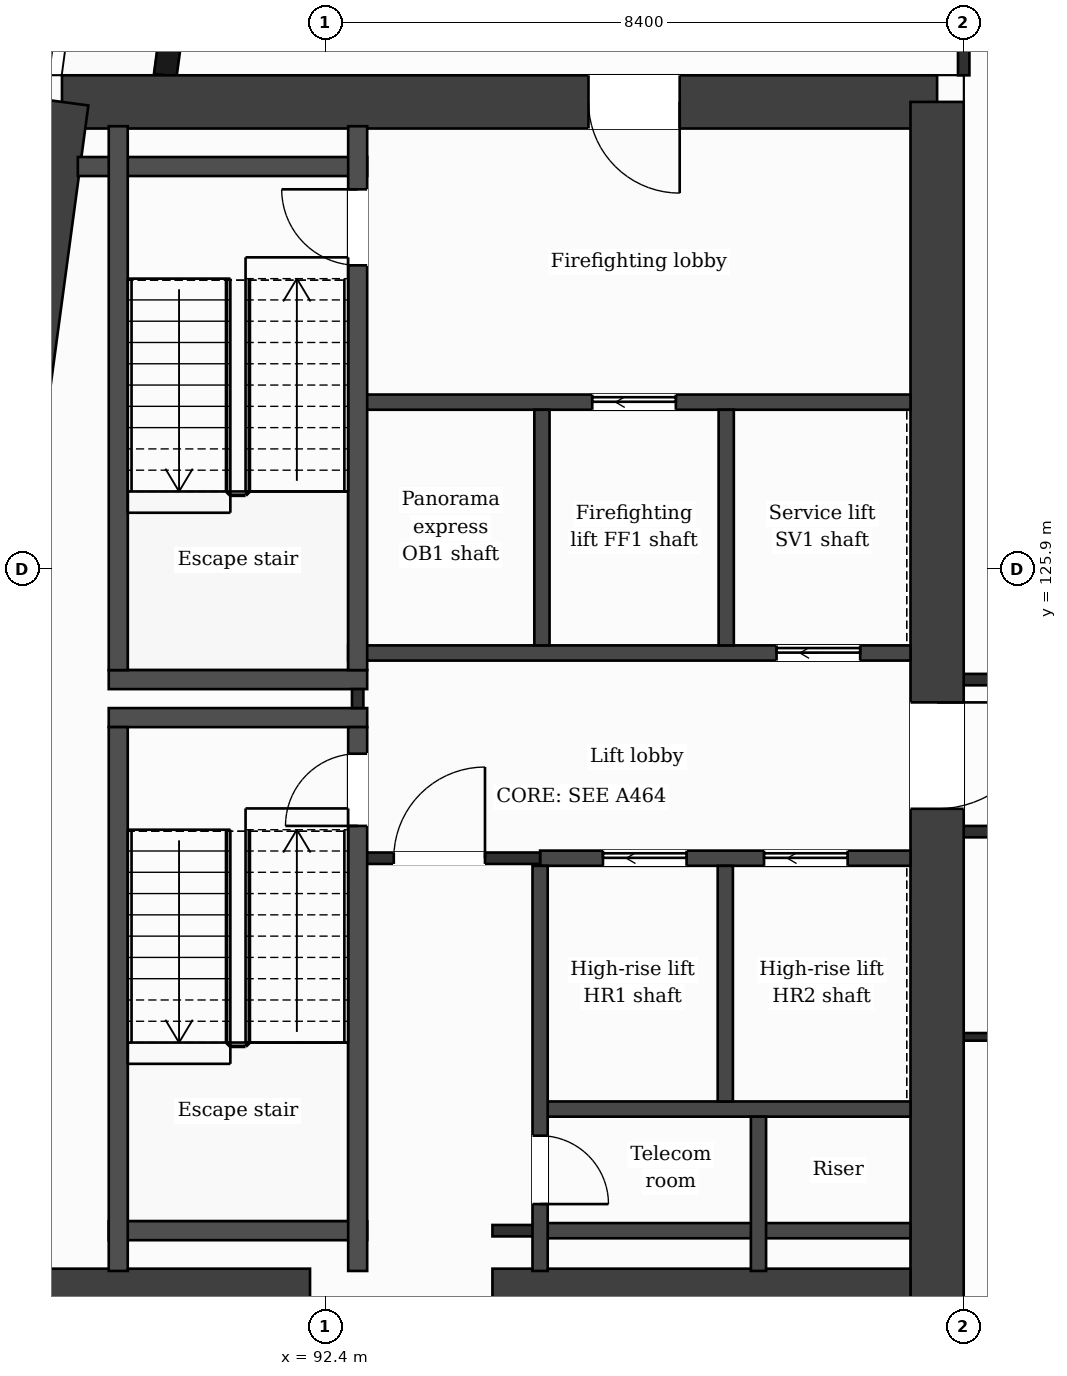
"""IFC4 building model, lengths in metres.
Left out: names, types, materials, properties, quantities, classifications, styles, units other than length and angle.
Written with IfcOpenShell. Run it as: python <this file> out.ifc"""

import sys

from ifc_helpers import new_model, si_unit, direction, frame, frame_2d, origin, place, context, subcontext, project, spatial, rectangle, extrude, element, fill, save


model = new_model("IFC4")
c1 = context("Model", 3, precision=1e-05, world=origin(), true_north=direction((0.0, 1.0)))
c2 = subcontext(c1, "Body", "Model", "MODEL_VIEW")
j1 = project(units=[si_unit("LENGTHUNIT", "METRE"), si_unit("PLANEANGLEUNIT", "RADIAN")], contexts=[c1])
p1 = place(None, origin())
s1 = spatial("IfcSite", under=j1, at=p1, CompositionType="ELEMENT")
p2 = place(p1, origin())
s2 = spatial("IfcBuilding", under=s1, at=p2, CompositionType="ELEMENT")
p3 = place(p2, frame((0.0, 0.0, 262.7)))
s3 = spatial("IfcBuildingStorey", under=s2, at=p3, CompositionType="ELEMENT", Elevation=262.7)
p4 = place(p3, frame((88.937, 132.05, 0.0), z_axis=(0.0, 0.0, 1.0), x_axis=(1.0, 0.0, 0.0)))
e1 = element("IfcWall", 1, at=p4, inside=s3, PredefinedType="SHEAR", context=c2, shape_type="SweptSolid", body=[
    extrude(rectangle(XDim=11.513, YDim=0.7, at=frame_2d((5.757, 0.0))), origin(), (0.0, 0.0, 1.0), 3.7),
])
p5 = place(p4, frame((6.927, 0.0, 0.0)))
e2 = element("IfcOpeningElement", 2, at=p5, cuts=e1, PredefinedType="OPENING", context=c2, shape_type="SweptSolid", body=[
    extrude(rectangle(XDim=1.2, YDim=2.1, at=frame_2d((0.6, 1.05))), frame((0.0, 0.36, 0.0), z_axis=(0.0, -1.0, 0.0), x_axis=(1.0, 0.0, 0.0)), (0.0, 0.0, 1.0), 0.72),
])
p6 = place(p3, frame((100.45, 132.05, 0.0), z_axis=(0.0, 0.0, 1.0), x_axis=(0.0, -1.0, 0.0)))
e3 = element("IfcWall", 3, at=p6, inside=s3, PredefinedType="SHEAR", context=c2, shape_type="SweptSolid", body=[
    extrude(rectangle(XDim=21.3, YDim=0.7, at=frame_2d((10.65, 0.0))), origin(), (0.0, 0.0, 1.0), 3.7),
])
p7 = place(p6, frame((7.9, 0.0, 0.0)))
e4 = element("IfcOpeningElement", 4, at=p7, cuts=e3, PredefinedType="OPENING", context=c2, shape_type="SweptSolid", body=[
    extrude(rectangle(XDim=1.4, YDim=2.1, at=frame_2d((0.7, 1.05))), frame((0.0, 0.36, 0.0), z_axis=(0.0, -1.0, 0.0), x_axis=(1.0, 0.0, 0.0)), (0.0, 0.0, 1.0), 0.72),
])
p8 = place(p3, frame((86.07, 110.75, 0.0), z_axis=(0.0, 0.0, 1.0), x_axis=(0.133406218907, 0.991061441464, 0.0)))
e5 = element("IfcWall", 5, at=p8, inside=s3, PredefinedType="SHEAR", context=c2, shape_type="SweptSolid", body=[
    extrude(rectangle(XDim=21.492, YDim=0.7, at=frame_2d((10.746, 0.0))), origin(), (0.0, 0.0, 1.0), 3.7),
])
p9 = place(p3, frame((87.123, 116.35, 0.0), z_axis=(0.0, 0.0, 1.0), x_axis=(1.0, 0.0, 0.0)))
e6 = element("IfcWall", 6, at=p9, inside=s3, PredefinedType="SHEAR", context=c2, shape_type="SweptSolid", body=[
    extrude(rectangle(XDim=5.077, YDim=0.7, at=frame_2d((2.539, 0.0))), origin(), (0.0, 0.0, 1.0), 3.7),
])
p10 = place(p3, frame((94.6, 116.35, 0.0), z_axis=(0.0, 0.0, 1.0), x_axis=(1.0, 0.0, 0.0)))
e7 = element("IfcWall", 7, at=p10, inside=s3, PredefinedType="SHEAR", context=c2, shape_type="SweptSolid", body=[
    extrude(rectangle(XDim=5.5, YDim=0.7, at=frame_2d((2.75, 0.0))), origin(), (0.0, 0.0, 1.0), 3.7),
])
p11 = place(p3, frame((91.177, 138.95, 0.0), z_axis=(0.0, 0.0, 1.0), x_axis=(-0.133426664613, -0.991058689065, 0.0)))
e8 = element("IfcWall", 8, at=p11, inside=s3, PredefinedType="SOLIDWALL", context=c2, shape_type="SweptSolid", body=[
    extrude(rectangle(XDim=6.609, YDim=0.3, at=frame_2d((3.305, 0.0))), origin(), (0.0, 0.0, 1.0), 3.38),
])
p12 = place(p11, frame((1.039, 0.0, 0.9)))
e9 = element("IfcOpeningElement", 9, at=p12, cuts=e8, PredefinedType="OPENING", context=c2, shape_type="SweptSolid", body=[
    extrude(rectangle(XDim=1.2, YDim=2.1, at=frame_2d((0.6, 1.05))), frame((0.0, 0.16, 0.0), z_axis=(0.0, -1.0, 0.0), x_axis=(1.0, 0.0, 0.0)), (0.0, 0.0, 1.0), 0.32),
])
p13 = place(p11, frame((4.294, 0.0, 0.0)))
e10 = element("IfcOpeningElement", 10, at=p13, cuts=e8, PredefinedType="OPENING", context=c2, shape_type="SweptSolid", body=[
    extrude(rectangle(XDim=1.2, YDim=2.4, at=frame_2d((0.6, 1.2))), frame((0.0, 0.16, 0.0), z_axis=(0.0, -1.0, 0.0), x_axis=(1.0, 0.0, 0.0)), (0.0, 0.0, 1.0), 0.32),
])
p14 = place(p3, frame((95.227, 117.2, 0.0), z_axis=(0.0, 0.0, 1.0), x_axis=(1.0, 0.0, 0.0)))
e11 = element("IfcWall", 11, at=p14, inside=s3, PredefinedType="PARTITIONING", context=c2, shape_type="SweptSolid", body=[
    extrude(rectangle(XDim=4.873, YDim=0.2, at=frame_2d((2.437, 0.0))), origin(), (0.0, 0.0, 1.0), 3.38),
])
p15 = place(p3, frame((94.6, 117.2, 0.0), z_axis=(0.0, 0.0, 1.0), x_axis=(1.0, 0.0, 0.0)))
e12 = element("IfcWall", 12, at=p15, inside=s3, PredefinedType="PARTITIONING", context=c2, shape_type="SweptSolid", body=[
    extrude(rectangle(XDim=0.627, YDim=0.15, at=frame_2d((0.313, 0.0))), origin(), (0.0, 0.0, 1.0), 3.38),
])
p16 = place(p3, frame((89.552, 117.2, 0.0), z_axis=(0.0, 0.0, 1.0), x_axis=(1.0, 0.0, 0.0)))
e13 = element("IfcWall", 13, at=p16, inside=s3, PredefinedType="PARTITIONING", context=c2, shape_type="SweptSolid", body=[
    extrude(rectangle(XDim=3.4, YDim=0.25, at=frame_2d((1.7, 0.0))), origin(), (0.0, 0.0, 1.0), 3.38),
])
p17 = place(p3, frame((95.227, 118.8, 0.0), z_axis=(0.0, 0.0, 1.0), x_axis=(1.0, 0.0, 0.0)))
e14 = element("IfcWall", 14, at=p17, inside=s3, PredefinedType="PARTITIONING", context=c2, shape_type="SweptSolid", body=[
    extrude(rectangle(XDim=4.873, YDim=0.2, at=frame_2d((2.437, 0.0))), origin(), (0.0, 0.0, 1.0), 3.38),
])
p18 = place(p3, frame((100.8, 119.75, 0.0), z_axis=(0.0, 0.0, 1.0), x_axis=(1.0, 0.0, 0.0)))
e15 = element("IfcWall", 15, at=p18, inside=s3, PredefinedType="PARTITIONING", context=c2, shape_type="SweptSolid", body=[
    extrude(rectangle(XDim=1.85, YDim=0.1, at=frame_2d((0.925, 0.0))), origin(), (0.0, 0.0, 1.0), 3.38),
])
p19 = place(p3, frame((95.227, 122.1, 0.0), z_axis=(0.0, 0.0, 1.0), x_axis=(1.0, 0.0, 0.0)))
e16 = element("IfcWall", 16, at=p19, inside=s3, PredefinedType="PARTITIONING", context=c2, shape_type="SweptSolid", body=[
    extrude(rectangle(XDim=4.873, YDim=0.2, at=frame_2d((2.437, 0.0))), origin(), (0.0, 0.0, 1.0), 3.38),
])
p20 = place(p19, frame((0.827, 0.0, 0.0)))
e17 = element("IfcOpeningElement", 17, at=p20, cuts=e16, PredefinedType="OPENING", context=c2, shape_type="SweptSolid", body=[
    extrude(rectangle(XDim=1.1, YDim=2.1, at=frame_2d((0.55, 1.05))), frame((0.0, 0.11, 0.0), z_axis=(0.0, -1.0, 0.0), x_axis=(1.0, 0.0, 0.0)), (0.0, 0.0, 1.0), 0.22),
])
p21 = place(p19, frame((2.946, 0.0, 0.0)))
e18 = element("IfcOpeningElement", 18, at=p21, cuts=e16, PredefinedType="OPENING", context=c2, shape_type="SweptSolid", body=[
    extrude(rectangle(XDim=1.1, YDim=2.1, at=frame_2d((0.55, 1.05))), frame((0.0, 0.11, 0.0), z_axis=(0.0, -1.0, 0.0), x_axis=(1.0, 0.0, 0.0)), (0.0, 0.0, 1.0), 0.22),
])
p22 = place(p3, frame((92.827, 122.1, 0.0), z_axis=(0.0, 0.0, 1.0), x_axis=(1.0, 0.0, 0.0)))
e19 = element("IfcWall", 19, at=p22, inside=s3, PredefinedType="PARTITIONING", context=c2, shape_type="SweptSolid", body=[
    extrude(rectangle(XDim=2.4, YDim=0.15, at=frame_2d((1.2, 0.0))), origin(), (0.0, 0.0, 1.0), 3.38),
])
p23 = place(p22, frame((0.475, 0.0, 0.0)))
e20 = element("IfcOpeningElement", 20, at=p23, cuts=e19, PredefinedType="OPENING", context=c2, shape_type="SweptSolid", body=[
    extrude(rectangle(XDim=1.2, YDim=2.1, at=frame_2d((0.6, 1.05))), frame((0.0, 0.085, 0.0), z_axis=(0.0, -1.0, 0.0), x_axis=(1.0, 0.0, 0.0)), (0.0, 0.0, 1.0), 0.17),
])
p24 = place(p3, frame((100.8, 122.45, 0.0), z_axis=(0.0, 0.0, 1.0), x_axis=(1.0, 0.0, 0.0)))
e21 = element("IfcWall", 21, at=p24, inside=s3, PredefinedType="PARTITIONING", context=c2, shape_type="SweptSolid", body=[
    extrude(rectangle(XDim=25.2, YDim=0.15, at=frame_2d((12.6, 0.0))), origin(), (0.0, 0.0, 1.0), 3.38),
])
p25 = place(p24, frame((5.55, 0.0, 0.0)))
e22 = element("IfcOpeningElement", 22, at=p25, cuts=e21, PredefinedType="OPENING", context=c2, shape_type="SweptSolid", body=[
    extrude(rectangle(XDim=1.0, YDim=2.1, at=frame_2d((0.5, 1.05))), frame((0.0, 0.085, 0.0), z_axis=(0.0, -1.0, 0.0), x_axis=(1.0, 0.0, 0.0)), (0.0, 0.0, 1.0), 0.17),
])
p26 = place(p24, frame((8.65, 0.0, 0.0)))
e23 = element("IfcOpeningElement", 23, at=p26, cuts=e21, PredefinedType="OPENING", context=c2, shape_type="SweptSolid", body=[
    extrude(rectangle(XDim=1.0, YDim=2.1, at=frame_2d((0.5, 1.05))), frame((0.0, 0.085, 0.0), z_axis=(0.0, -1.0, 0.0), x_axis=(1.0, 0.0, 0.0)), (0.0, 0.0, 1.0), 0.17),
])
p27 = place(p24, frame((19.83, 0.0, 0.0)))
e24 = element("IfcOpeningElement", 24, at=p27, cuts=e21, PredefinedType="OPENING", context=c2, shape_type="SweptSolid", body=[
    extrude(rectangle(XDim=1.0, YDim=2.1, at=frame_2d((0.5, 1.05))), frame((0.0, 0.085, 0.0), z_axis=(0.0, -1.0, 0.0), x_axis=(1.0, 0.0, 0.0)), (0.0, 0.0, 1.0), 0.17),
])
for number, where, z_axis, x_axis in (
    (25, (89.552, 123.95, 0.0), (0.0, 0.0, 1.0), (1.0, 0.0, 0.0)),
    (26, (89.552, 124.45, 0.0), (0.0, 0.0, 1.0), (1.0, 0.0, 0.0)),
):
    element("IfcWall", number, at=place(p3, frame(where, z_axis=z_axis, x_axis=x_axis)), inside=s3, PredefinedType="PARTITIONING", context=c2, shape_type="SweptSolid", body=[
        extrude(rectangle(XDim=3.4, YDim=0.25, at=frame_2d((1.7, 0.0))), origin(), (0.0, 0.0, 1.0), 3.38),
    ])
p28 = place(p3, frame((100.8, 124.45, 0.0), z_axis=(0.0, 0.0, 1.0), x_axis=(1.0, 0.0, 0.0)))
e27 = element("IfcWall", 27, at=p28, inside=s3, PredefinedType="PARTITIONING", context=c2, shape_type="SweptSolid", body=[
    extrude(rectangle(XDim=25.2, YDim=0.15, at=frame_2d((12.6, 0.0))), origin(), (0.0, 0.0, 1.0), 3.38),
])
p29 = place(p28, frame((0.975, 0.0, 0.0)))
e28 = element("IfcOpeningElement", 28, at=p29, cuts=e27, PredefinedType="OPENING", context=c2, shape_type="SweptSolid", body=[
    extrude(rectangle(XDim=1.0, YDim=2.1, at=frame_2d((0.5, 1.05))), frame((0.0, 0.085, 0.0), z_axis=(0.0, -1.0, 0.0), x_axis=(1.0, 0.0, 0.0)), (0.0, 0.0, 1.0), 0.17),
])
p30 = place(p28, frame((5.175, 0.0, 0.0)))
e29 = element("IfcOpeningElement", 29, at=p30, cuts=e27, PredefinedType="OPENING", context=c2, shape_type="SweptSolid", body=[
    extrude(rectangle(XDim=1.0, YDim=2.1, at=frame_2d((0.5, 1.05))), frame((0.0, 0.085, 0.0), z_axis=(0.0, -1.0, 0.0), x_axis=(1.0, 0.0, 0.0)), (0.0, 0.0, 1.0), 0.17),
])
p31 = place(p28, frame((13.775, 0.0, 0.0)))
e30 = element("IfcOpeningElement", 30, at=p31, cuts=e27, PredefinedType="OPENING", context=c2, shape_type="SweptSolid", body=[
    extrude(rectangle(XDim=1.0, YDim=2.1, at=frame_2d((0.5, 1.05))), frame((0.0, 0.085, 0.0), z_axis=(0.0, -1.0, 0.0), x_axis=(1.0, 0.0, 0.0)), (0.0, 0.0, 1.0), 0.17),
])
p32 = place(p28, frame((17.67, 0.0, 0.0)))
e31 = element("IfcOpeningElement", 31, at=p32, cuts=e27, PredefinedType="OPENING", context=c2, shape_type="SweptSolid", body=[
    extrude(rectangle(XDim=1.0, YDim=2.1, at=frame_2d((0.5, 1.05))), frame((0.0, 0.085, 0.0), z_axis=(0.0, -1.0, 0.0), x_axis=(1.0, 0.0, 0.0)), (0.0, 0.0, 1.0), 0.17),
])
p33 = place(p28, frame((23.225, 0.0, 0.0)))
e32 = element("IfcOpeningElement", 32, at=p33, cuts=e27, PredefinedType="OPENING", context=c2, shape_type="SweptSolid", body=[
    extrude(rectangle(XDim=1.0, YDim=2.1, at=frame_2d((0.5, 1.05))), frame((0.0, 0.085, 0.0), z_axis=(0.0, -1.0, 0.0), x_axis=(1.0, 0.0, 0.0)), (0.0, 0.0, 1.0), 0.17),
])
p34 = place(p3, frame((92.702, 124.8, 0.0), z_axis=(0.0, 0.0, 1.0), x_axis=(1.0, 0.0, 0.0)))
e33 = element("IfcWall", 33, at=p34, inside=s3, PredefinedType="PARTITIONING", context=c2, shape_type="SweptSolid", body=[
    extrude(rectangle(XDim=7.398, YDim=0.2, at=frame_2d((3.699, 0.0))), origin(), (0.0, 0.0, 1.0), 3.38),
])
p35 = place(p34, frame((5.636, 0.0, 0.0)))
e34 = element("IfcOpeningElement", 34, at=p35, cuts=e33, PredefinedType="OPENING", context=c2, shape_type="SweptSolid", body=[
    extrude(rectangle(XDim=1.1, YDim=2.1, at=frame_2d((0.55, 1.05))), frame((0.0, 0.11, 0.0), z_axis=(0.0, -1.0, 0.0), x_axis=(1.0, 0.0, 0.0)), (0.0, 0.0, 1.0), 0.22),
])
p36 = place(p3, frame((92.827, 128.1, 0.0), z_axis=(0.0, 0.0, 1.0), x_axis=(1.0, 0.0, 0.0)))
e35 = element("IfcWall", 35, at=p36, inside=s3, PredefinedType="PARTITIONING", context=c2, shape_type="SweptSolid", body=[
    extrude(rectangle(XDim=7.273, YDim=0.2, at=frame_2d((3.637, 0.0))), origin(), (0.0, 0.0, 1.0), 3.38),
])
p37 = place(p36, frame((3.086, 0.0, 0.0)))
e36 = element("IfcOpeningElement", 36, at=p37, cuts=e35, PredefinedType="OPENING", context=c2, shape_type="SweptSolid", body=[
    extrude(rectangle(XDim=1.1, YDim=2.1, at=frame_2d((0.55, 1.05))), frame((0.0, 0.11, 0.0), z_axis=(0.0, -1.0, 0.0), x_axis=(1.0, 0.0, 0.0)), (0.0, 0.0, 1.0), 0.22),
])
p38 = place(p3, frame((89.146, 131.2, 0.0), z_axis=(0.0, 0.0, 1.0), x_axis=(1.0, 0.0, 0.0)))
e37 = element("IfcWall", 37, at=p38, inside=s3, PredefinedType="PARTITIONING", context=c2, shape_type="SweptSolid", body=[
    extrude(rectangle(XDim=3.806, YDim=0.25, at=frame_2d((1.903, 0.0))), origin(), (0.0, 0.0, 1.0), 3.38),
])
for number, where, z_axis, x_axis in (
    (38, (89.677, 116.67, 0.0), (0.0, 0.0, 1.0), (0.0, 1.0, 0.0)),
    (39, (89.677, 124.575, 0.0), (0.0, 0.0, 1.0), (0.0, 1.0, 0.0)),
):
    element("IfcWall", number, at=place(p3, frame(where, z_axis=z_axis, x_axis=x_axis)), inside=s3, PredefinedType="PARTITIONING", context=c2, shape_type="SweptSolid", body=[
        extrude(rectangle(XDim=7.155, YDim=0.25, at=frame_2d((3.578, 0.0))), origin(), (0.0, 0.0, 1.0), 3.38),
    ])
p39 = place(p3, frame((92.827, 124.075, 0.0), z_axis=(0.0, 0.0, 1.0), x_axis=(0.0, 1.0, 0.0)))
e40 = element("IfcWall", 40, at=p39, inside=s3, PredefinedType="PARTITIONING", context=c2, shape_type="SweptSolid", body=[
    extrude(rectangle(XDim=0.25, YDim=0.15, at=frame_2d((0.125, 0.0))), origin(), (0.0, 0.0, 1.0), 3.38),
])
p40 = place(p3, frame((92.827, 116.67, 0.0), z_axis=(0.0, 0.0, 1.0), x_axis=(0.0, 1.0, 0.0)))
e41 = element("IfcWall", 41, at=p40, inside=s3, PredefinedType="PARTITIONING", context=c2, shape_type="SweptSolid", body=[
    extrude(rectangle(XDim=7.155, YDim=0.25, at=frame_2d((3.578, 0.0))), origin(), (0.0, 0.0, 1.0), 3.38),
])
p41 = place(p40, frame((5.855, 0.0, 0.0)))
e42 = element("IfcOpeningElement", 42, at=p41, cuts=e41, PredefinedType="OPENING", context=c2, shape_type="SweptSolid", body=[
    extrude(rectangle(XDim=0.95, YDim=2.1, at=frame_2d((0.475, 1.05))), frame((0.0, 0.135, 0.0), z_axis=(0.0, -1.0, 0.0), x_axis=(1.0, 0.0, 0.0)), (0.0, 0.0, 1.0), 0.27),
])
p42 = place(p3, frame((92.827, 124.575, 0.0), z_axis=(0.0, 0.0, 1.0), x_axis=(0.0, 1.0, 0.0)))
e43 = element("IfcWall", 43, at=p42, inside=s3, PredefinedType="PARTITIONING", context=c2, shape_type="SweptSolid", body=[
    extrude(rectangle(XDim=7.155, YDim=0.25, at=frame_2d((3.578, 0.0))), origin(), (0.0, 0.0, 1.0), 3.38),
])
p43 = place(p42, frame((5.325, 0.0, 0.0)))
e44 = element("IfcOpeningElement", 44, at=p43, cuts=e43, PredefinedType="OPENING", context=c2, shape_type="SweptSolid", body=[
    extrude(rectangle(XDim=1.0, YDim=2.1, at=frame_2d((0.5, 1.05))), frame((0.0, 0.135, 0.0), z_axis=(0.0, -1.0, 0.0), x_axis=(1.0, 0.0, 0.0)), (0.0, 0.0, 1.0), 0.27),
])
p44 = place(p3, frame((95.227, 116.67, 0.0), z_axis=(0.0, 0.0, 1.0), x_axis=(0.0, 1.0, 0.0)))
e45 = element("IfcWall", 45, at=p44, inside=s3, PredefinedType="PARTITIONING", context=c2, shape_type="SweptSolid", body=[
    extrude(rectangle(XDim=5.33, YDim=0.2, at=frame_2d((2.665, 0.0))), origin(), (0.0, 0.0, 1.0), 3.38),
])
p45 = place(p44, frame((0.88, 0.0, 0.0)))
e46 = element("IfcOpeningElement", 46, at=p45, cuts=e45, PredefinedType="OPENING", context=c2, shape_type="SweptSolid", body=[
    extrude(rectangle(XDim=0.9, YDim=2.1, at=frame_2d((0.45, 1.05))), frame((0.0, 0.11, 0.0), z_axis=(0.0, -1.0, 0.0), x_axis=(1.0, 0.0, 0.0)), (0.0, 0.0, 1.0), 0.22),
])
for number, where, z_axis, x_axis in (
    (47, (95.251, 124.9, 0.0), (0.0, 0.0, 1.0), (0.0, 1.0, 0.0)),
    (48, (97.664, 118.9, 0.0), (0.0, 0.0, 1.0), (0.0, 1.0, 0.0)),
    (49, (97.676, 124.9, 0.0), (0.0, 0.0, 1.0), (0.0, 1.0, 0.0)),
):
    element("IfcWall", number, at=place(p3, frame(where, z_axis=z_axis, x_axis=x_axis)), inside=s3, PredefinedType="PARTITIONING", context=c2, shape_type="SweptSolid", body=[
        extrude(rectangle(XDim=3.1, YDim=0.2, at=frame_2d((1.55, 0.0))), origin(), (0.0, 0.0, 1.0), 3.38),
    ])
p46 = place(p3, frame((98.1, 116.67, 0.0), z_axis=(0.0, 0.0, 1.0), x_axis=(0.0, 1.0, 0.0)))
e50 = element("IfcWall", 50, at=p46, inside=s3, PredefinedType="PARTITIONING", context=c2, shape_type="SweptSolid", body=[
    extrude(rectangle(XDim=2.03, YDim=0.2, at=frame_2d((1.015, 0.0))), origin(), (0.0, 0.0, 1.0), 3.38),
])
p47 = place(p3, frame((100.8, 132.4, 0.0), z_axis=(0.0, 0.0, 1.0), x_axis=(0.0, 1.0, 0.0)))
e51 = element("IfcWall", 51, at=p47, inside=s3, PredefinedType="PARTITIONING", context=c2, shape_type="SweptSolid", body=[
    extrude(rectangle(XDim=1.325, YDim=0.15, at=frame_2d((0.663, 0.0))), origin(), (0.0, 0.0, 1.0), 3.38),
])
p48 = place(p23, origin())
e52 = element("IfcDoor", 52, at=p48, inside=s3, OperationType="SINGLE_SWING_RIGHT", PredefinedType="DOOR", context=c2, shape_type="SweptSolid", body=[
    extrude(rectangle(XDim=1.2, YDim=2.1, at=frame_2d((0.6, 1.05))), frame((0.0, 0.025, 0.0), z_axis=(0.0, -1.0, 0.0), x_axis=(1.0, 0.0, 0.0)), (0.0, 0.0, 1.0), 0.05),
])
fill(e20, e52)
p49 = place(p20, origin())
e53 = element("IfcDoor", 53, at=p49, inside=s3, OperationType="SLIDING_TO_LEFT", PredefinedType="DOOR", context=c2, shape_type="SweptSolid", body=[
    extrude(rectangle(XDim=1.1, YDim=2.1, at=frame_2d((0.55, 1.05))), frame((0.0, 0.025, 0.0), z_axis=(0.0, -1.0, 0.0), x_axis=(1.0, 0.0, 0.0)), (0.0, 0.0, 1.0), 0.05),
])
fill(e17, e53)
p50 = place(p21, origin())
e54 = element("IfcDoor", 54, at=p50, inside=s3, OperationType="SLIDING_TO_LEFT", PredefinedType="DOOR", context=c2, shape_type="SweptSolid", body=[
    extrude(rectangle(XDim=1.1, YDim=2.1, at=frame_2d((0.55, 1.05))), frame((0.0, 0.025, 0.0), z_axis=(0.0, -1.0, 0.0), x_axis=(1.0, 0.0, 0.0)), (0.0, 0.0, 1.0), 0.05),
])
fill(e18, e54)
p51 = place(p37, origin())
e55 = element("IfcDoor", 55, at=p51, inside=s3, OperationType="SLIDING_TO_LEFT", PredefinedType="DOOR", context=c2, shape_type="SweptSolid", body=[
    extrude(rectangle(XDim=1.1, YDim=2.1, at=frame_2d((0.55, 1.05))), frame((0.0, 0.025, 0.0), z_axis=(0.0, -1.0, 0.0), x_axis=(1.0, 0.0, 0.0)), (0.0, 0.0, 1.0), 0.05),
])
fill(e36, e55)
p52 = place(p35, origin())
e56 = element("IfcDoor", 56, at=p52, inside=s3, OperationType="SLIDING_TO_LEFT", PredefinedType="DOOR", context=c2, shape_type="SweptSolid", body=[
    extrude(rectangle(XDim=1.1, YDim=2.1, at=frame_2d((0.55, 1.05))), frame((0.0, 0.025, 0.0), z_axis=(0.0, -1.0, 0.0), x_axis=(1.0, 0.0, 0.0)), (0.0, 0.0, 1.0), 0.05),
])
fill(e34, e56)
p53 = place(p41, origin())
e57 = element("IfcDoor", 57, at=p53, inside=s3, OperationType="SINGLE_SWING_LEFT", PredefinedType="DOOR", context=c2, shape_type="SweptSolid", body=[
    extrude(rectangle(XDim=0.95, YDim=2.1, at=frame_2d((0.475, 1.05))), frame((0.0, 0.025, 0.0), z_axis=(0.0, -1.0, 0.0), x_axis=(1.0, 0.0, 0.0)), (0.0, 0.0, 1.0), 0.05),
])
fill(e42, e57)
p54 = place(p43, origin())
e58 = element("IfcDoor", 58, at=p54, inside=s3, OperationType="SINGLE_SWING_RIGHT", PredefinedType="DOOR", context=c2, shape_type="SweptSolid", body=[
    extrude(rectangle(XDim=1.0, YDim=2.1, at=frame_2d((0.5, 1.05))), frame((0.0, 0.025, 0.0), z_axis=(0.0, -1.0, 0.0), x_axis=(1.0, 0.0, 0.0)), (0.0, 0.0, 1.0), 0.05),
])
fill(e44, e58)
p55 = place(p45, origin())
e59 = element("IfcDoor", 59, at=p55, inside=s3, OperationType="SINGLE_SWING_LEFT", PredefinedType="DOOR", context=c2, shape_type="SweptSolid", body=[
    extrude(rectangle(XDim=0.9, YDim=2.1, at=frame_2d((0.45, 1.05))), frame((0.0, 0.025, 0.0), z_axis=(0.0, -1.0, 0.0), x_axis=(1.0, 0.0, 0.0)), (0.0, 0.0, 1.0), 0.05),
])
fill(e46, e59)
p56 = place(p5, origin())
e60 = element("IfcDoor", 60, at=p56, inside=s3, OperationType="SINGLE_SWING_RIGHT", PredefinedType="DOOR", context=c2, shape_type="SweptSolid", body=[
    extrude(rectangle(XDim=1.2, YDim=2.1, at=frame_2d((0.6, 1.05))), frame((0.0, 0.025, 0.0), z_axis=(0.0, -1.0, 0.0), x_axis=(1.0, 0.0, 0.0)), (0.0, 0.0, 1.0), 0.05),
])
fill(e2, e60)
p57 = place(p7, origin())
e61 = element("IfcDoor", 61, at=p57, inside=s3, OperationType="SINGLE_SWING_LEFT", PredefinedType="DOOR", context=c2, shape_type="SweptSolid", body=[
    extrude(rectangle(XDim=1.4, YDim=2.1, at=frame_2d((0.7, 1.05))), frame((0.0, 0.025, 0.0), z_axis=(0.0, -1.0, 0.0), x_axis=(1.0, 0.0, 0.0)), (0.0, 0.0, 1.0), 0.05),
])
fill(e4, e61)
save(model, sys.argv[1])
